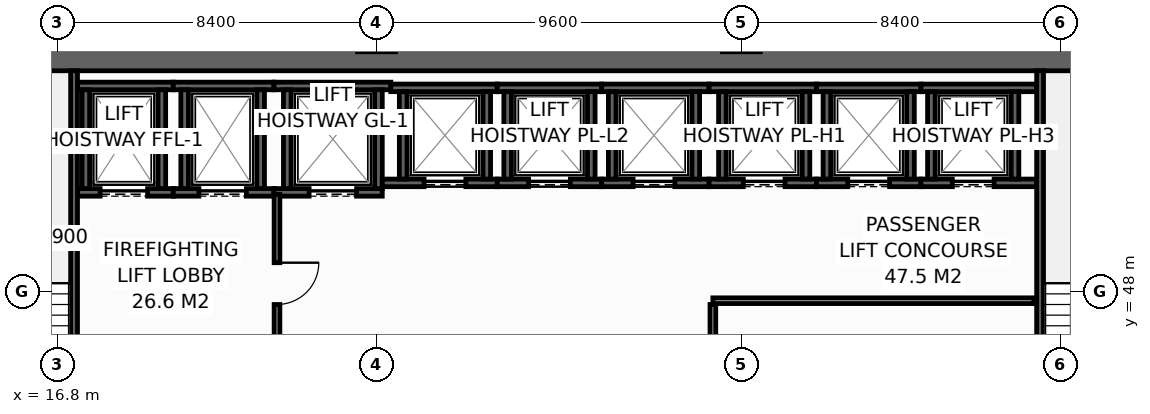
"""IFC4 building model, lengths in metres.
Left out: names, types, materials, properties, quantities, classifications, styles, units other than length and angle.
Written with IfcOpenShell. Run it as: python <this file> out.ifc"""

import sys

from ifc_helpers import new_model, si_unit, direction, frame, frame_2d, origin, place, context, subcontext, project, spatial, rectangle, extrude, element, fill, save


model = new_model("IFC4")
c1 = context("Model", 3, precision=1e-05, world=origin(), true_north=direction((0.0, 1.0)))
c2 = subcontext(c1, "Body", "Model", "MODEL_VIEW")
j1 = project(units=[si_unit("LENGTHUNIT", "METRE"), si_unit("PLANEANGLEUNIT", "RADIAN")], contexts=[c1])
p1 = place(None, origin())
s1 = spatial("IfcSite", under=j1, at=p1, CompositionType="ELEMENT")
p2 = place(p1, origin())
s2 = spatial("IfcBuilding", under=s1, at=p2, CompositionType="ELEMENT")
p3 = place(p2, frame((0.0, 0.0, 119.2)))
s3 = spatial("IfcBuildingStorey", under=s2, at=p3, CompositionType="ELEMENT", Elevation=119.2)
p4 = place(p3, frame((13.5, 54.1, 0.0), z_axis=(0.0, 0.0, 1.0), x_axis=(1.0, 0.0, 0.0)))
e1 = element("IfcWall", 1, at=p4, inside=s3, PredefinedType="SHEAR", context=c2, shape_type="SweptSolid", body=[
    extrude(rectangle(XDim=32.9, YDim=0.6, at=frame_2d((16.45, 0.0))), origin(), (0.0, 0.0, 1.0), 3.95),
])
p5 = place(p3, frame((17.33, 50.6, 0.0), z_axis=(0.0, 0.0, 1.0), x_axis=(1.0, 0.0, 0.0)))
e2 = element("IfcWall", 2, at=p5, inside=s3, PredefinedType="SHEAR", context=c2, shape_type="SweptSolid", body=[
    extrude(rectangle(XDim=2.52, YDim=0.2, at=frame_2d((1.26, 0.0))), origin(), (0.0, 0.0, 1.0), 3.95),
])
p6 = place(p5, frame((0.595, 0.0, 0.0)))
e3 = element("IfcOpeningElement", 3, at=p6, cuts=e2, PredefinedType="OPENING", context=c2, shape_type="SweptSolid", body=[
    extrude(rectangle(XDim=1.25, YDim=2.3, at=frame_2d((0.625, 1.15))), frame((0.0, 0.11, 0.0), z_axis=(0.0, -1.0, 0.0), x_axis=(1.0, 0.0, 0.0)), (0.0, 0.0, 1.0), 0.22),
])
p7 = place(p3, frame((17.33, 53.4, 0.0), z_axis=(0.0, 0.0, 1.0), x_axis=(1.0, 0.0, 0.0)))
e4 = element("IfcWall", 4, at=p7, inside=s3, PredefinedType="SHEAR", context=c2, shape_type="SweptSolid", body=[
    extrude(rectangle(XDim=2.52, YDim=0.2, at=frame_2d((1.26, 0.0))), origin(), (0.0, 0.0, 1.0), 3.95),
])
for number, where, z_axis, x_axis in (
    (5, (17.55, 50.7, 0.0), (0.0, 0.0, 1.0), (0.0, 1.0, 0.0)),
    (6, (19.55, 50.7, 0.0), (0.0, 0.0, 1.0), (0.0, 1.0, 0.0)),
):
    element("IfcWall", number, at=place(p3, frame(where, z_axis=z_axis, x_axis=x_axis)), inside=s3, PredefinedType="SHEAR", context=c2, shape_type="SweptSolid", body=[
        extrude(rectangle(XDim=2.6, YDim=0.2, at=frame_2d((1.3, 0.0))), origin(), (0.0, 0.0, 1.0), 3.95),
    ])
p8 = place(p3, frame((19.85, 50.6, 0.0), z_axis=(0.0, 0.0, 1.0), x_axis=(1.0, 0.0, 0.0)))
e7 = element("IfcWall", 7, at=p8, inside=s3, PredefinedType="SHEAR", context=c2, shape_type="SweptSolid", body=[
    extrude(rectangle(XDim=2.65, YDim=0.2, at=frame_2d((1.325, 0.0))), origin(), (0.0, 0.0, 1.0), 3.95),
])
p9 = place(p8, frame((0.675, 0.0, 0.0)))
e8 = element("IfcOpeningElement", 8, at=p9, cuts=e7, PredefinedType="OPENING", context=c2, shape_type="SweptSolid", body=[
    extrude(rectangle(XDim=1.25, YDim=2.3, at=frame_2d((0.625, 1.15))), frame((0.0, 0.11, 0.0), z_axis=(0.0, -1.0, 0.0), x_axis=(1.0, 0.0, 0.0)), (0.0, 0.0, 1.0), 0.22),
])
p10 = place(p3, frame((19.85, 53.4, 0.0), z_axis=(0.0, 0.0, 1.0), x_axis=(1.0, 0.0, 0.0)))
e9 = element("IfcWall", 9, at=p10, inside=s3, PredefinedType="SHEAR", context=c2, shape_type="SweptSolid", body=[
    extrude(rectangle(XDim=2.65, YDim=0.2, at=frame_2d((1.325, 0.0))), origin(), (0.0, 0.0, 1.0), 3.95),
])
for number, where, z_axis, x_axis in (
    (10, (20.15, 50.7, 0.0), (0.0, 0.0, 1.0), (0.0, 1.0, 0.0)),
    (11, (22.15, 50.7, 0.0), (0.0, 0.0, 1.0), (0.0, 1.0, 0.0)),
):
    element("IfcWall", number, at=place(p3, frame(where, z_axis=z_axis, x_axis=x_axis)), inside=s3, PredefinedType="SHEAR", context=c2, shape_type="SweptSolid", body=[
        extrude(rectangle(XDim=2.6, YDim=0.2, at=frame_2d((1.3, 0.0))), origin(), (0.0, 0.0, 1.0), 3.95),
    ])
p11 = place(p3, frame((22.5, 50.6, 0.0), z_axis=(0.0, 0.0, 1.0), x_axis=(1.0, 0.0, 0.0)))
e12 = element("IfcWall", 12, at=p11, inside=s3, PredefinedType="SHEAR", context=c2, shape_type="SweptSolid", body=[
    extrude(rectangle(XDim=2.85, YDim=0.2, at=frame_2d((1.425, 0.0))), origin(), (0.0, 0.0, 1.0), 3.95),
])
p12 = place(p11, frame((0.925, 0.0, 0.0)))
e13 = element("IfcOpeningElement", 13, at=p12, cuts=e12, PredefinedType="OPENING", context=c2, shape_type="SweptSolid", body=[
    extrude(rectangle(XDim=1.25, YDim=2.3, at=frame_2d((0.625, 1.15))), frame((0.0, 0.11, 0.0), z_axis=(0.0, -1.0, 0.0), x_axis=(1.0, 0.0, 0.0)), (0.0, 0.0, 1.0), 0.22),
])
p13 = place(p3, frame((22.5, 53.4, 0.0), z_axis=(0.0, 0.0, 1.0), x_axis=(1.0, 0.0, 0.0)))
e14 = element("IfcWall", 14, at=p13, inside=s3, PredefinedType="SHEAR", context=c2, shape_type="SweptSolid", body=[
    extrude(rectangle(XDim=3.075, YDim=0.2, at=frame_2d((1.538, 0.0))), origin(), (0.0, 0.0, 1.0), 3.95),
])
for number, where, z_axis, x_axis in (
    (15, (22.85, 50.7, 0.0), (0.0, 0.0, 1.0), (0.0, 1.0, 0.0)),
    (16, (25.25, 50.7, 0.0), (0.0, 0.0, 1.0), (0.0, 1.0, 0.0)),
):
    element("IfcWall", number, at=place(p3, frame(where, z_axis=z_axis, x_axis=x_axis)), inside=s3, PredefinedType="SHEAR", context=c2, shape_type="SweptSolid", body=[
        extrude(rectangle(XDim=2.6, YDim=0.2, at=frame_2d((1.3, 0.0))), origin(), (0.0, 0.0, 1.0), 3.95),
    ])
p14 = place(p3, frame((25.35, 50.85, 0.0), z_axis=(0.0, 0.0, 1.0), x_axis=(1.0, 0.0, 0.0)))
e17 = element("IfcWall", 17, at=p14, inside=s3, PredefinedType="SHEAR", context=c2, shape_type="SweptSolid", body=[
    extrude(rectangle(XDim=3.025, YDim=0.2, at=frame_2d((1.512, 0.0))), origin(), (0.0, 0.0, 1.0), 3.73),
])
p15 = place(p14, frame((1.1, 0.0, 0.0)))
e18 = element("IfcOpeningElement", 18, at=p15, cuts=e17, PredefinedType="OPENING", context=c2, shape_type="SweptSolid", body=[
    extrude(rectangle(XDim=1.1, YDim=2.2, at=frame_2d((0.55, 1.1))), frame((0.0, 0.11, 0.0), z_axis=(0.0, -1.0, 0.0), x_axis=(1.0, 0.0, 0.0)), (0.0, 0.0, 1.0), 0.22),
])
p16 = place(p3, frame((25.575, 53.35, 0.0), z_axis=(0.0, 0.0, 1.0), x_axis=(1.0, 0.0, 0.0)))
e19 = element("IfcWall", 19, at=p16, inside=s3, PredefinedType="SHEAR", context=c2, shape_type="SweptSolid", body=[
    extrude(rectangle(XDim=2.8, YDim=0.2, at=frame_2d((1.4, 0.0))), origin(), (0.0, 0.0, 1.0), 3.73),
])
for number, where, z_axis, x_axis in (
    (20, (25.9, 50.95, 0.0), (0.0, 0.0, 1.0), (0.0, 1.0, 0.0)),
    (21, (28.1, 50.95, 0.0), (0.0, 0.0, 1.0), (0.0, 1.0, 0.0)),
):
    element("IfcWall", number, at=place(p3, frame(where, z_axis=z_axis, x_axis=x_axis)), inside=s3, PredefinedType="SHEAR", context=c2, shape_type="SweptSolid", body=[
        extrude(rectangle(XDim=2.3, YDim=0.2, at=frame_2d((1.15, 0.0))), origin(), (0.0, 0.0, 1.0), 3.73),
    ])
p17 = place(p3, frame((28.375, 50.85, 0.0), z_axis=(0.0, 0.0, 1.0), x_axis=(1.0, 0.0, 0.0)))
e22 = element("IfcWall", 22, at=p17, inside=s3, PredefinedType="SHEAR", context=c2, shape_type="SweptSolid", body=[
    extrude(rectangle(XDim=2.75, YDim=0.2, at=frame_2d((1.375, 0.0))), origin(), (0.0, 0.0, 1.0), 3.73),
])
p18 = place(p17, frame((0.825, 0.0, 0.0)))
e23 = element("IfcOpeningElement", 23, at=p18, cuts=e22, PredefinedType="OPENING", context=c2, shape_type="SweptSolid", body=[
    extrude(rectangle(XDim=1.1, YDim=2.2, at=frame_2d((0.55, 1.1))), frame((0.0, 0.11, 0.0), z_axis=(0.0, -1.0, 0.0), x_axis=(1.0, 0.0, 0.0)), (0.0, 0.0, 1.0), 0.22),
])
p19 = place(p3, frame((28.375, 53.35, 0.0), z_axis=(0.0, 0.0, 1.0), x_axis=(1.0, 0.0, 0.0)))
e24 = element("IfcWall", 24, at=p19, inside=s3, PredefinedType="SHEAR", context=c2, shape_type="SweptSolid", body=[
    extrude(rectangle(XDim=2.75, YDim=0.2, at=frame_2d((1.375, 0.0))), origin(), (0.0, 0.0, 1.0), 3.73),
])
for number, where, z_axis, x_axis in (
    (25, (28.65, 50.95, 0.0), (0.0, 0.0, 1.0), (0.0, 1.0, 0.0)),
    (26, (30.85, 50.95, 0.0), (0.0, 0.0, 1.0), (0.0, 1.0, 0.0)),
):
    element("IfcWall", number, at=place(p3, frame(where, z_axis=z_axis, x_axis=x_axis)), inside=s3, PredefinedType="SHEAR", context=c2, shape_type="SweptSolid", body=[
        extrude(rectangle(XDim=2.3, YDim=0.2, at=frame_2d((1.15, 0.0))), origin(), (0.0, 0.0, 1.0), 3.73),
    ])
p20 = place(p3, frame((31.125, 50.85, 0.0), z_axis=(0.0, 0.0, 1.0), x_axis=(1.0, 0.0, 0.0)))
e27 = element("IfcWall", 27, at=p20, inside=s3, PredefinedType="SHEAR", context=c2, shape_type="SweptSolid", body=[
    extrude(rectangle(XDim=2.825, YDim=0.2, at=frame_2d((1.413, 0.0))), origin(), (0.0, 0.0, 1.0), 3.73),
])
p21 = place(p20, frame((0.825, 0.0, 0.0)))
e28 = element("IfcOpeningElement", 28, at=p21, cuts=e27, PredefinedType="OPENING", context=c2, shape_type="SweptSolid", body=[
    extrude(rectangle(XDim=1.1, YDim=2.2, at=frame_2d((0.55, 1.1))), frame((0.0, 0.11, 0.0), z_axis=(0.0, -1.0, 0.0), x_axis=(1.0, 0.0, 0.0)), (0.0, 0.0, 1.0), 0.22),
])
p22 = place(p3, frame((31.125, 53.35, 0.0), z_axis=(0.0, 0.0, 1.0), x_axis=(1.0, 0.0, 0.0)))
e29 = element("IfcWall", 29, at=p22, inside=s3, PredefinedType="SHEAR", context=c2, shape_type="SweptSolid", body=[
    extrude(rectangle(XDim=2.825, YDim=0.2, at=frame_2d((1.413, 0.0))), origin(), (0.0, 0.0, 1.0), 3.73),
])
for number, where, z_axis, x_axis in (
    (30, (31.4, 50.95, 0.0), (0.0, 0.0, 1.0), (0.0, 1.0, 0.0)),
    (31, (33.6, 50.95, 0.0), (0.0, 0.0, 1.0), (0.0, 1.0, 0.0)),
):
    element("IfcWall", number, at=place(p3, frame(where, z_axis=z_axis, x_axis=x_axis)), inside=s3, PredefinedType="SHEAR", context=c2, shape_type="SweptSolid", body=[
        extrude(rectangle(XDim=2.3, YDim=0.2, at=frame_2d((1.15, 0.0))), origin(), (0.0, 0.0, 1.0), 3.73),
    ])
p23 = place(p3, frame((33.95, 50.85, 0.0), z_axis=(0.0, 0.0, 1.0), x_axis=(1.0, 0.0, 0.0)))
e32 = element("IfcWall", 32, at=p23, inside=s3, PredefinedType="SHEAR", context=c2, shape_type="SweptSolid", body=[
    extrude(rectangle(XDim=2.825, YDim=0.2, at=frame_2d((1.413, 0.0))), origin(), (0.0, 0.0, 1.0), 3.95),
])
p24 = place(p23, frame((0.9, 0.0, 0.0)))
e33 = element("IfcOpeningElement", 33, at=p24, cuts=e32, PredefinedType="OPENING", context=c2, shape_type="SweptSolid", body=[
    extrude(rectangle(XDim=1.1, YDim=2.2, at=frame_2d((0.55, 1.1))), frame((0.0, 0.11, 0.0), z_axis=(0.0, -1.0, 0.0), x_axis=(1.0, 0.0, 0.0)), (0.0, 0.0, 1.0), 0.22),
])
p25 = place(p3, frame((33.95, 53.35, 0.0), z_axis=(0.0, 0.0, 1.0), x_axis=(1.0, 0.0, 0.0)))
e34 = element("IfcWall", 34, at=p25, inside=s3, PredefinedType="SHEAR", context=c2, shape_type="SweptSolid", body=[
    extrude(rectangle(XDim=2.825, YDim=0.2, at=frame_2d((1.413, 0.0))), origin(), (0.0, 0.0, 1.0), 3.95),
])
for number, where, z_axis, x_axis in (
    (35, (34.3, 50.95, 0.0), (0.0, 0.0, 1.0), (0.0, 1.0, 0.0)),
    (36, (36.5, 50.95, 0.0), (0.0, 0.0, 1.0), (0.0, 1.0, 0.0)),
):
    element("IfcWall", number, at=place(p3, frame(where, z_axis=z_axis, x_axis=x_axis)), inside=s3, PredefinedType="SHEAR", context=c2, shape_type="SweptSolid", body=[
        extrude(rectangle(XDim=2.3, YDim=0.2, at=frame_2d((1.15, 0.0))), origin(), (0.0, 0.0, 1.0), 3.95),
    ])
p26 = place(p3, frame((36.775, 50.85, 0.0), z_axis=(0.0, 0.0, 1.0), x_axis=(1.0, 0.0, 0.0)))
e37 = element("IfcWall", 37, at=p26, inside=s3, PredefinedType="SHEAR", context=c2, shape_type="SweptSolid", body=[
    extrude(rectangle(XDim=2.75, YDim=0.2, at=frame_2d((1.375, 0.0))), origin(), (0.0, 0.0, 1.0), 3.95),
])
p27 = place(p26, frame((0.825, 0.0, 0.0)))
e38 = element("IfcOpeningElement", 38, at=p27, cuts=e37, PredefinedType="OPENING", context=c2, shape_type="SweptSolid", body=[
    extrude(rectangle(XDim=1.1, YDim=2.2, at=frame_2d((0.55, 1.1))), frame((0.0, 0.11, 0.0), z_axis=(0.0, -1.0, 0.0), x_axis=(1.0, 0.0, 0.0)), (0.0, 0.0, 1.0), 0.22),
])
p28 = place(p3, frame((36.775, 53.35, 0.0), z_axis=(0.0, 0.0, 1.0), x_axis=(1.0, 0.0, 0.0)))
e39 = element("IfcWall", 39, at=p28, inside=s3, PredefinedType="SHEAR", context=c2, shape_type="SweptSolid", body=[
    extrude(rectangle(XDim=2.75, YDim=0.2, at=frame_2d((1.375, 0.0))), origin(), (0.0, 0.0, 1.0), 3.95),
])
for number, where, z_axis, x_axis in (
    (40, (37.05, 50.95, 0.0), (0.0, 0.0, 1.0), (0.0, 1.0, 0.0)),
    (41, (39.25, 50.95, 0.0), (0.0, 0.0, 1.0), (0.0, 1.0, 0.0)),
):
    element("IfcWall", number, at=place(p3, frame(where, z_axis=z_axis, x_axis=x_axis)), inside=s3, PredefinedType="SHEAR", context=c2, shape_type="SweptSolid", body=[
        extrude(rectangle(XDim=2.3, YDim=0.2, at=frame_2d((1.15, 0.0))), origin(), (0.0, 0.0, 1.0), 3.95),
    ])
p29 = place(p3, frame((39.525, 50.85, 0.0), z_axis=(0.0, 0.0, 1.0), x_axis=(1.0, 0.0, 0.0)))
e42 = element("IfcWall", 42, at=p29, inside=s3, PredefinedType="SHEAR", context=c2, shape_type="SweptSolid", body=[
    extrude(rectangle(XDim=3.045, YDim=0.2, at=frame_2d((1.522, 0.0))), origin(), (0.0, 0.0, 1.0), 3.95),
])
p30 = place(p29, frame((0.825, 0.0, 0.0)))
e43 = element("IfcOpeningElement", 43, at=p30, cuts=e42, PredefinedType="OPENING", context=c2, shape_type="SweptSolid", body=[
    extrude(rectangle(XDim=1.1, YDim=2.2, at=frame_2d((0.55, 1.1))), frame((0.0, 0.11, 0.0), z_axis=(0.0, -1.0, 0.0), x_axis=(1.0, 0.0, 0.0)), (0.0, 0.0, 1.0), 0.22),
])
p31 = place(p3, frame((39.525, 53.35, 0.0), z_axis=(0.0, 0.0, 1.0), x_axis=(1.0, 0.0, 0.0)))
e44 = element("IfcWall", 44, at=p31, inside=s3, PredefinedType="SHEAR", context=c2, shape_type="SweptSolid", body=[
    extrude(rectangle(XDim=3.045, YDim=0.2, at=frame_2d((1.522, 0.0))), origin(), (0.0, 0.0, 1.0), 3.95),
])
for number, where, z_axis, x_axis in (
    (45, (39.8, 50.95, 0.0), (0.0, 0.0, 1.0), (0.0, 1.0, 0.0)),
    (46, (42.0, 50.95, 0.0), (0.0, 0.0, 1.0), (0.0, 1.0, 0.0)),
):
    element("IfcWall", number, at=place(p3, frame(where, z_axis=z_axis, x_axis=x_axis)), inside=s3, PredefinedType="SHEAR", context=c2, shape_type="SweptSolid", body=[
        extrude(rectangle(XDim=2.3, YDim=0.2, at=frame_2d((1.15, 0.0))), origin(), (0.0, 0.0, 1.0), 3.95),
    ])
p32 = place(p3, frame((17.24, 43.4, 0.0), z_axis=(0.0, 0.0, 1.0), x_axis=(0.0, 1.0, 0.0)))
e47 = element("IfcWall", 47, at=p32, inside=s3, PredefinedType="SHEAR", context=c2, shape_type="SweptSolid", body=[
    extrude(rectangle(XDim=10.4, YDim=0.18, at=frame_2d((5.2, 0.0))), origin(), (0.0, 0.0, 1.0), 3.95),
])
p33 = place(p32, frame((0.16, 0.0, 0.0)))
e48 = element("IfcOpeningElement", 48, at=p33, cuts=e47, PredefinedType="OPENING", context=c2, shape_type="SweptSolid", body=[
    extrude(rectangle(XDim=1.0, YDim=2.15, at=frame_2d((0.5, 1.075))), frame((0.0, 0.1, 0.0), z_axis=(0.0, -1.0, 0.0), x_axis=(1.0, 0.0, 0.0)), (0.0, 0.0, 1.0), 0.2),
])
p34 = place(p3, frame((42.66, 53.8, 0.0), z_axis=(0.0, 0.0, 1.0), x_axis=(0.0, -1.0, 0.0)))
e49 = element("IfcWall", 49, at=p34, inside=s3, PredefinedType="SHEAR", context=c2, shape_type="SweptSolid", body=[
    extrude(rectangle(XDim=10.4, YDim=0.18, at=frame_2d((5.2, 0.0))), origin(), (0.0, 0.0, 1.0), 3.95),
])
p35 = place(p34, frame((8.99, 0.0, 0.0)))
e50 = element("IfcOpeningElement", 50, at=p35, cuts=e49, PredefinedType="OPENING", context=c2, shape_type="SweptSolid", body=[
    extrude(rectangle(XDim=1.1, YDim=2.15, at=frame_2d((0.55, 1.075))), frame((0.0, 0.1, 0.0), z_axis=(0.0, -1.0, 0.0), x_axis=(1.0, 0.0, 0.0)), (0.0, 0.0, 1.0), 0.2),
])
p36 = place(p3, frame((22.58, 50.55, 0.0), z_axis=(0.0, 0.0, 1.0), x_axis=(0.0, -1.0, 0.0)))
e51 = element("IfcWall", 51, at=p36, inside=s3, PredefinedType="PARTITIONING", context=c2, shape_type="SweptSolid", body=[
    extrude(rectangle(XDim=5.33, YDim=0.15, at=frame_2d((2.665, 0.0))), origin(), (0.0, 0.0, 1.0), 3.95),
])
p37 = place(p36, frame((1.8, 0.0, 0.0)))
e52 = element("IfcOpeningElement", 52, at=p37, cuts=e51, PredefinedType="OPENING", context=c2, shape_type="SweptSolid", body=[
    extrude(rectangle(XDim=1.1, YDim=2.15, at=frame_2d((0.55, 1.075))), frame((0.0, 0.085, 0.0), z_axis=(0.0, -1.0, 0.0), x_axis=(1.0, 0.0, 0.0)), (0.0, 0.0, 1.0), 0.17),
])
p38 = place(p3, frame((34.05, 47.75, 0.0), z_axis=(0.0, 0.0, 1.0), x_axis=(1.0, 0.0, 0.0)))
e53 = element("IfcWall", 53, at=p38, inside=s3, PredefinedType="PARTITIONING", context=c2, shape_type="SweptSolid", body=[
    extrude(rectangle(XDim=8.45, YDim=0.15, at=frame_2d((4.225, 0.0))), origin(), (0.0, 0.0, 1.0), 3.95),
])
p39 = place(p3, frame((34.05, 45.22, 0.0), z_axis=(0.0, 0.0, 1.0), x_axis=(0.0, 1.0, 0.0)))
e54 = element("IfcWall", 54, at=p39, inside=s3, PredefinedType="PARTITIONING", context=c2, shape_type="SweptSolid", body=[
    extrude(rectangle(XDim=2.43, YDim=0.15, at=frame_2d((1.215, 0.0))), origin(), (0.0, 0.0, 1.0), 3.95),
])
p40 = place(p6, origin())
e55 = element("IfcDoor", 55, at=p40, inside=s3, OperationType="SLIDING_TO_LEFT", PredefinedType="DOOR", context=c2, shape_type="SweptSolid", body=[
    extrude(rectangle(XDim=1.25, YDim=2.3, at=frame_2d((0.625, 1.15))), frame((0.0, 0.025, 0.0), z_axis=(0.0, -1.0, 0.0), x_axis=(1.0, 0.0, 0.0)), (0.0, 0.0, 1.0), 0.05),
])
fill(e3, e55)
p41 = place(p9, origin())
e56 = element("IfcDoor", 56, at=p41, inside=s3, OperationType="SLIDING_TO_LEFT", PredefinedType="DOOR", context=c2, shape_type="SweptSolid", body=[
    extrude(rectangle(XDim=1.25, YDim=2.3, at=frame_2d((0.625, 1.15))), frame((0.0, 0.025, 0.0), z_axis=(0.0, -1.0, 0.0), x_axis=(1.0, 0.0, 0.0)), (0.0, 0.0, 1.0), 0.05),
])
fill(e8, e56)
p42 = place(p12, origin())
e57 = element("IfcDoor", 57, at=p42, inside=s3, OperationType="SLIDING_TO_LEFT", PredefinedType="DOOR", context=c2, shape_type="SweptSolid", body=[
    extrude(rectangle(XDim=1.25, YDim=2.3, at=frame_2d((0.625, 1.15))), frame((0.0, 0.025, 0.0), z_axis=(0.0, -1.0, 0.0), x_axis=(1.0, 0.0, 0.0)), (0.0, 0.0, 1.0), 0.05),
])
fill(e13, e57)
p43 = place(p15, origin())
e58 = element("IfcDoor", 58, at=p43, inside=s3, OperationType="SLIDING_TO_LEFT", PredefinedType="DOOR", context=c2, shape_type="SweptSolid", body=[
    extrude(rectangle(XDim=1.1, YDim=2.2, at=frame_2d((0.55, 1.1))), frame((0.0, 0.025, 0.0), z_axis=(0.0, -1.0, 0.0), x_axis=(1.0, 0.0, 0.0)), (0.0, 0.0, 1.0), 0.05),
])
fill(e18, e58)
p44 = place(p18, origin())
e59 = element("IfcDoor", 59, at=p44, inside=s3, OperationType="SLIDING_TO_LEFT", PredefinedType="DOOR", context=c2, shape_type="SweptSolid", body=[
    extrude(rectangle(XDim=1.1, YDim=2.2, at=frame_2d((0.55, 1.1))), frame((0.0, 0.025, 0.0), z_axis=(0.0, -1.0, 0.0), x_axis=(1.0, 0.0, 0.0)), (0.0, 0.0, 1.0), 0.05),
])
fill(e23, e59)
p45 = place(p21, origin())
e60 = element("IfcDoor", 60, at=p45, inside=s3, OperationType="SLIDING_TO_LEFT", PredefinedType="DOOR", context=c2, shape_type="SweptSolid", body=[
    extrude(rectangle(XDim=1.1, YDim=2.2, at=frame_2d((0.55, 1.1))), frame((0.0, 0.025, 0.0), z_axis=(0.0, -1.0, 0.0), x_axis=(1.0, 0.0, 0.0)), (0.0, 0.0, 1.0), 0.05),
])
fill(e28, e60)
p46 = place(p24, origin())
e61 = element("IfcDoor", 61, at=p46, inside=s3, OperationType="SLIDING_TO_LEFT", PredefinedType="DOOR", context=c2, shape_type="SweptSolid", body=[
    extrude(rectangle(XDim=1.1, YDim=2.2, at=frame_2d((0.55, 1.1))), frame((0.0, 0.025, 0.0), z_axis=(0.0, -1.0, 0.0), x_axis=(1.0, 0.0, 0.0)), (0.0, 0.0, 1.0), 0.05),
])
fill(e33, e61)
p47 = place(p27, origin())
e62 = element("IfcDoor", 62, at=p47, inside=s3, OperationType="SLIDING_TO_LEFT", PredefinedType="DOOR", context=c2, shape_type="SweptSolid", body=[
    extrude(rectangle(XDim=1.1, YDim=2.2, at=frame_2d((0.55, 1.1))), frame((0.0, 0.025, 0.0), z_axis=(0.0, -1.0, 0.0), x_axis=(1.0, 0.0, 0.0)), (0.0, 0.0, 1.0), 0.05),
])
fill(e38, e62)
p48 = place(p30, origin())
e63 = element("IfcDoor", 63, at=p48, inside=s3, OperationType="SLIDING_TO_LEFT", PredefinedType="DOOR", context=c2, shape_type="SweptSolid", body=[
    extrude(rectangle(XDim=1.1, YDim=2.2, at=frame_2d((0.55, 1.1))), frame((0.0, 0.025, 0.0), z_axis=(0.0, -1.0, 0.0), x_axis=(1.0, 0.0, 0.0)), (0.0, 0.0, 1.0), 0.05),
])
fill(e43, e63)
p49 = place(p37, origin())
e64 = element("IfcDoor", 64, at=p49, inside=s3, OperationType="SINGLE_SWING_LEFT", PredefinedType="DOOR", context=c2, shape_type="SweptSolid", body=[
    extrude(rectangle(XDim=1.1, YDim=2.15, at=frame_2d((0.55, 1.075))), frame((0.0, 0.025, 0.0), z_axis=(0.0, -1.0, 0.0), x_axis=(1.0, 0.0, 0.0)), (0.0, 0.0, 1.0), 0.05),
])
fill(e52, e64)
save(model, sys.argv[1])
